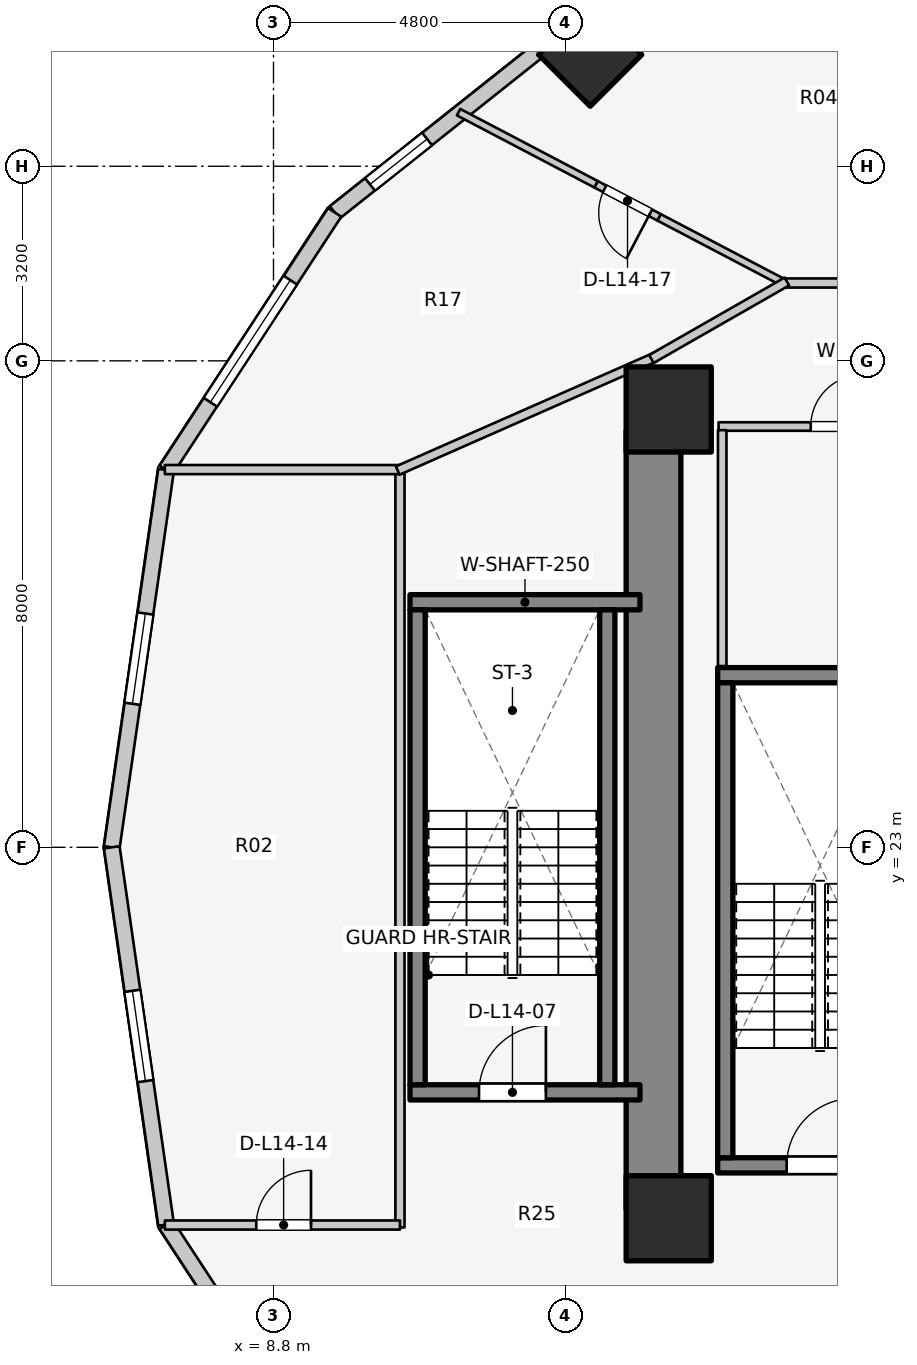
"""IFC4 building model, lengths in metres.
Left out: names, types, materials, properties, quantities, classifications, styles, units other than length and angle.
Written with IfcOpenShell. Run it as: python <this file> out.ifc"""

import sys

from ifc_helpers import new_model, si_unit, direction, frame, frame_2d, origin, origin_2d, place, context, subcontext, project, spatial, rectangle, extrude, element, fill, save


model = new_model("IFC4")
c1 = context("Model", 3, precision=1e-05, world=origin(), true_north=direction((0.0, 1.0)))
c2 = subcontext(c1, "Body", "Model", "MODEL_VIEW")
j1 = project(units=[si_unit("LENGTHUNIT", "METRE"), si_unit("PLANEANGLEUNIT", "RADIAN")], contexts=[c1])
p1 = place(None, origin())
s1 = spatial("IfcSite", under=j1, at=p1, CompositionType="ELEMENT")
p2 = place(p1, origin())
s2 = spatial("IfcBuilding", under=s1, at=p2, CompositionType="ELEMENT")
p3 = place(p2, frame((0.0, 0.0, 49.3)))
s3 = spatial("IfcBuildingStorey", under=s2, at=p3, CompositionType="ELEMENT", Elevation=49.3)
p4 = place(p3, frame((15.05, 17.05, 0.0), z_axis=(0.0, 0.0, 1.0), x_axis=(0.0, 1.0, 0.0)))
e1 = element("IfcWall", 1, at=p4, inside=s3, PredefinedType="SHEAR", context=c2, shape_type="SweptSolid", body=[
    extrude(rectangle(XDim=12.8, YDim=0.9, at=frame_2d((6.4, 0.0))), origin(), (0.0, 0.0, 1.0), 3.1),
])
p5 = place(p3, frame((16.105, 17.77, 0.0), z_axis=(0.0, 0.0, 1.0), x_axis=(1.0, 0.0, 0.0)))
e2 = element("IfcWall", 2, at=p5, inside=s3, PredefinedType="SOLIDWALL", context=c2, shape_type="SweptSolid", body=[
    extrude(rectangle(XDim=3.37, YDim=0.25, at=frame_2d((1.685, 0.0))), origin(), (0.0, 0.0, 1.0), 3.1),
])
p6 = place(p5, frame((1.135, 0.0, 0.0)))
e3 = element("IfcOpeningElement", 3, at=p6, cuts=e2, PredefinedType="OPENING", context=c2, shape_type="SweptSolid", body=[
    extrude(rectangle(XDim=1.1, YDim=2.1, at=frame_2d((0.55, 1.05))), frame((0.0, 0.135, 0.0), z_axis=(0.0, -1.0, 0.0), x_axis=(1.0, 0.0, 0.0)), (0.0, 0.0, 1.0), 0.27),
])
p7 = place(p3, frame((16.105, 25.83, 0.0), z_axis=(0.0, 0.0, 1.0), x_axis=(1.0, 0.0, 0.0)))
e4 = element("IfcWall", 4, at=p7, inside=s3, PredefinedType="SOLIDWALL", context=c2, shape_type="SweptSolid", body=[
    extrude(rectangle(XDim=3.37, YDim=0.25, at=frame_2d((1.685, 0.0))), origin(), (0.0, 0.0, 1.0), 3.1),
])
p8 = place(p3, frame((16.23, 17.895, 0.0), z_axis=(0.0, 0.0, 1.0), x_axis=(0.0, 1.0, 0.0)))
e5 = element("IfcWall", 5, at=p8, inside=s3, PredefinedType="SOLIDWALL", context=c2, shape_type="SweptSolid", body=[
    extrude(rectangle(XDim=7.81, YDim=0.25, at=frame_2d((3.905, 0.0))), origin(), (0.0, 0.0, 1.0), 3.1),
])
p9 = place(p3, frame((11.045, 18.97, 0.0), z_axis=(0.0, 0.0, 1.0), x_axis=(1.0, 0.0, 0.0)))
e6 = element("IfcWall", 6, at=p9, inside=s3, PredefinedType="SOLIDWALL", context=c2, shape_type="SweptSolid", body=[
    extrude(rectangle(XDim=3.782, YDim=0.25, at=frame_2d((1.891, 0.0))), origin(), (0.0, 0.0, 1.0), 3.1),
])
p10 = place(p9, frame((1.135, 0.0, 0.0)))
e7 = element("IfcOpeningElement", 7, at=p10, cuts=e6, PredefinedType="OPENING", context=c2, shape_type="SweptSolid", body=[
    extrude(rectangle(XDim=1.1, YDim=2.1, at=frame_2d((0.55, 1.05))), frame((0.0, 0.135, 0.0), z_axis=(0.0, -1.0, 0.0), x_axis=(1.0, 0.0, 0.0)), (0.0, 0.0, 1.0), 0.27),
])
p11 = place(p3, frame((11.045, 27.03, 0.0), z_axis=(0.0, 0.0, 1.0), x_axis=(1.0, 0.0, 0.0)))
e8 = element("IfcWall", 8, at=p11, inside=s3, PredefinedType="SOLIDWALL", context=c2, shape_type="SweptSolid", body=[
    extrude(rectangle(XDim=3.782, YDim=0.25, at=frame_2d((1.891, 0.0))), origin(), (0.0, 0.0, 1.0), 3.1),
])
for number, where, z_axis, x_axis in (
    (9, (11.17, 19.095, 0.0), (0.0, 0.0, 1.0), (0.0, 1.0, 0.0)),
    (10, (14.29, 19.095, 0.0), (0.0, 0.0, 1.0), (0.0, 1.0, 0.0)),
):
    element("IfcWall", number, at=place(p3, frame(where, z_axis=z_axis, x_axis=x_axis)), inside=s3, PredefinedType="SOLIDWALL", context=c2, shape_type="SweptSolid", body=[
        extrude(rectangle(XDim=7.81, YDim=0.25, at=frame_2d((3.905, 0.0))), origin(), (0.0, 0.0, 1.0), 3.1),
    ])
for number, where, z_axis, x_axis in (
    (11, (15.3, 16.9, 0.0), (0.0, 0.0, 1.0), (1.0, 0.0, 0.0)),
    (12, (15.3, 30.2, 0.0), (0.0, 0.0, 1.0), (1.0, 0.0, 0.0)),
):
    element("IfcColumn", number, at=place(p3, frame(where, z_axis=z_axis, x_axis=x_axis)), inside=s3, PredefinedType="COLUMN", context=c2, shape_type="SweptSolid", body=[
        extrude(rectangle(XDim=1.4, YDim=1.4, at=origin_2d()), origin(), (0.0, 0.0, 1.0), 3.1),
    ])
p12 = place(p3, frame((14.008, 36.035, 0.0), z_axis=(0.0, 0.0, 1.0), x_axis=(-0.707106781187, 0.707106781187, 0.0)))
e13 = element("IfcColumn", 13, at=p12, inside=s3, PredefinedType="COLUMN", context=c2, shape_type="SweptSolid", body=[
    extrude(rectangle(XDim=1.2, YDim=1.2, at=origin_2d()), origin(), (0.0, 0.0, 1.0), 3.1),
])
p13 = place(p3, frame((13.595, 36.45, 0.0), z_axis=(0.0, 0.0, 1.0), x_axis=(-0.783123133379, -0.621866672179, 0.0)))
e14 = element("IfcWall", 14, at=p13, inside=s3, PredefinedType="STANDARD", context=c2, shape_type="SweptSolid", body=[
    extrude(rectangle(XDim=4.839, YDim=0.26, at=frame_2d((2.419, 0.0))), origin(), (0.0, 0.0, 1.0), 2.85),
])
p14 = place(p13, frame((2.898, 0.0, 0.75)))
e15 = element("IfcOpeningElement", 15, at=p14, cuts=e14, PredefinedType="OPENING", context=c2, shape_type="SweptSolid", body=[
    extrude(rectangle(XDim=1.2, YDim=1.5, at=frame_2d((0.6, 0.75))), frame((0.0, 0.14, 0.0), z_axis=(0.0, -1.0, 0.0), x_axis=(1.0, 0.0, 0.0)), (0.0, 0.0, 1.0), 0.28),
])
p15 = place(p3, frame((9.806, 33.441, 0.0), z_axis=(0.0, 0.0, 1.0), x_axis=(-0.547702757047, -0.836672988642, 0.0)))
e16 = element("IfcWall", 16, at=p15, inside=s3, PredefinedType="STANDARD", context=c2, shape_type="SweptSolid", body=[
    extrude(rectangle(XDim=5.062, YDim=0.26, at=frame_2d((2.531, 0.0))), origin(), (0.0, 0.0, 1.0), 2.85),
])
p16 = place(p15, frame((1.331, 0.0, 0.75)))
e17 = element("IfcOpeningElement", 17, at=p16, cuts=e16, PredefinedType="OPENING", context=c2, shape_type="SweptSolid", body=[
    extrude(rectangle(XDim=2.4, YDim=1.7, at=frame_2d((1.2, 0.85))), frame((0.0, 0.14, 0.0), z_axis=(0.0, -1.0, 0.0), x_axis=(1.0, 0.0, 0.0)), (0.0, 0.0, 1.0), 0.28),
])
p17 = place(p3, frame((7.033, 29.205, 0.0), z_axis=(0.0, 0.0, 1.0), x_axis=(-0.142528001686, -0.989790770181, 0.0)))
e18 = element("IfcWall", 18, at=p17, inside=s3, PredefinedType="STANDARD", context=c2, shape_type="SweptSolid", body=[
    extrude(rectangle(XDim=6.269, YDim=0.26, at=frame_2d((3.135, 0.0))), origin(), (0.0, 0.0, 1.0), 2.85),
])
p18 = place(p17, frame((2.385, 0.0, 0.75)))
e19 = element("IfcOpeningElement", 19, at=p18, cuts=e18, PredefinedType="OPENING", context=c2, shape_type="SweptSolid", body=[
    extrude(rectangle(XDim=1.5, YDim=1.6, at=frame_2d((0.75, 0.8))), frame((0.0, 0.14, 0.0), z_axis=(0.0, -1.0, 0.0), x_axis=(1.0, 0.0, 0.0)), (0.0, 0.0, 1.0), 0.28),
])
p19 = place(p3, frame((6.14, 23.0, 0.0), z_axis=(0.0, 0.0, 1.0), x_axis=(0.142528001686, -0.989790770181, 0.0)))
e20 = element("IfcWall", 20, at=p19, inside=s3, PredefinedType="STANDARD", context=c2, shape_type="SweptSolid", body=[
    extrude(rectangle(XDim=6.269, YDim=0.26, at=frame_2d((3.135, 0.0))), origin(), (0.0, 0.0, 1.0), 2.85),
])
p20 = place(p19, frame((2.385, 0.0, 0.75)))
e21 = element("IfcOpeningElement", 21, at=p20, cuts=e20, PredefinedType="OPENING", context=c2, shape_type="SweptSolid", body=[
    extrude(rectangle(XDim=1.5, YDim=1.6, at=frame_2d((0.75, 0.8))), frame((0.0, 0.14, 0.0), z_axis=(0.0, -1.0, 0.0), x_axis=(1.0, 0.0, 0.0)), (0.0, 0.0, 1.0), 0.28),
])
p21 = place(p3, frame((7.033, 16.795, 0.0), z_axis=(0.0, 0.0, 1.0), x_axis=(0.547702757047, -0.836672988642, 0.0)))
e22 = element("IfcWall", 22, at=p21, inside=s3, PredefinedType="STANDARD", context=c2, shape_type="SweptSolid", body=[
    extrude(rectangle(XDim=5.062, YDim=0.26, at=frame_2d((2.531, 0.0))), origin(), (0.0, 0.0, 1.0), 2.85),
])
p22 = place(p21, frame((1.331, 0.0, 0.75)))
e23 = element("IfcOpeningElement", 23, at=p22, cuts=e22, PredefinedType="OPENING", context=c2, shape_type="SweptSolid", body=[
    extrude(rectangle(XDim=2.4, YDim=1.7, at=frame_2d((1.2, 0.85))), frame((0.0, 0.14, 0.0), z_axis=(0.0, -1.0, 0.0), x_axis=(1.0, 0.0, 0.0)), (0.0, 0.0, 1.0), 0.28),
])
p23 = place(p3, frame((16.12, 29.92, 0.0), z_axis=(0.0, 0.0, 1.0), x_axis=(1.0, 0.0, 0.0)))
e24 = element("IfcWall", 24, at=p23, inside=s3, PredefinedType="PLUMBINGWALL", context=c2, shape_type="SweptSolid", body=[
    extrude(rectangle(XDim=3.3, YDim=0.14, at=frame_2d((1.65, 0.0))), origin(), (0.0, 0.0, 1.0), 2.855),
])
p24 = place(p23, frame((1.516, 0.0, 0.0)))
e25 = element("IfcOpeningElement", 25, at=p24, cuts=e24, PredefinedType="OPENING", context=c2, shape_type="SweptSolid", body=[
    extrude(rectangle(XDim=0.85, YDim=2.05, at=frame_2d((0.425, 1.025))), frame((0.0, 0.08, 0.0), z_axis=(0.0, -1.0, 0.0), x_axis=(1.0, 0.0, 0.0)), (0.0, 0.0, 1.0), 0.16),
])
p25 = place(p3, frame((16.18, 25.98, 0.0), z_axis=(0.0, 0.0, 1.0), x_axis=(0.0, 1.0, 0.0)))
e26 = element("IfcWall", 26, at=p25, inside=s3, PredefinedType="PLUMBINGWALL", context=c2, shape_type="SweptSolid", body=[
    extrude(rectangle(XDim=3.88, YDim=0.14, at=frame_2d((1.94, 0.0))), origin(), (0.0, 0.0, 1.0), 2.855),
])
p26 = place(p3, frame((10.88, 16.748, 0.0), z_axis=(0.0, 0.0, 1.0), x_axis=(0.0, 1.0, 0.0)))
e27 = element("IfcWall", 27, at=p26, inside=s3, PredefinedType="PARTITIONING", context=c2, shape_type="SweptSolid", body=[
    extrude(rectangle(XDim=12.503, YDim=0.15, at=frame_2d((6.252, 0.0))), origin(), (0.0, 0.0, 1.0), 2.12),
])
p27 = place(p3, frame((7.014, 16.788, 0.0), z_axis=(0.0, 0.0, 1.0), x_axis=(1.0, 0.0, 0.0)))
e28 = element("IfcWall", 28, at=p27, inside=s3, PredefinedType="PARTITIONING", context=c2, shape_type="SweptSolid", body=[
    extrude(rectangle(XDim=3.866, YDim=0.15, at=frame_2d((1.933, 0.0))), origin(), (0.0, 0.0, 1.0), 2.855),
])
p28 = place(p27, frame((1.503, 0.0, 0.0)))
e29 = element("IfcOpeningElement", 29, at=p28, cuts=e28, PredefinedType="OPENING", context=c2, shape_type="SweptSolid", body=[
    extrude(rectangle(XDim=0.9, YDim=2.1, at=frame_2d((0.45, 1.05))), frame((0.0, 0.085, 0.0), z_axis=(0.0, -1.0, 0.0), x_axis=(1.0, 0.0, 0.0)), (0.0, 0.0, 1.0), 0.17),
])
p29 = place(p3, frame((7.014, 29.212, 0.0), z_axis=(0.0, 0.0, 1.0), x_axis=(1.0, 0.0, 0.0)))
e30 = element("IfcWall", 30, at=p29, inside=s3, PredefinedType="PARTITIONING", context=c2, shape_type="SweptSolid", body=[
    extrude(rectangle(XDim=3.866, YDim=0.15, at=frame_2d((1.933, 0.0))), origin(), (0.0, 0.0, 1.0), 2.855),
])
p30 = place(p3, frame((10.844, 29.196, 0.0), z_axis=(0.0, 0.0, 1.0), x_axis=(0.91502756289, 0.403391322604, 0.0)))
e31 = element("IfcWall", 31, at=p30, inside=s3, PredefinedType="PARTITIONING", context=c2, shape_type="SweptSolid", body=[
    extrude(rectangle(XDim=4.637, YDim=0.15, at=frame_2d((2.319, 0.0))), origin(), (0.0, 0.0, 1.0), 2.069),
])
p31 = place(p3, frame((17.244, 32.257, 0.0), z_axis=(0.0, 0.0, 1.0), x_axis=(-0.885586030676, 0.464475383924, 0.0)))
e32 = element("IfcWall", 32, at=p31, inside=s3, PredefinedType="MOVABLE", context=c2, shape_type="SweptSolid", body=[
    extrude(rectangle(XDim=2.376, YDim=0.12, at=frame_2d((1.188, 0.0))), origin(), (0.0, 0.0, 1.0), 2.855),
])
p32 = place(p3, frame((15.14, 33.36, 0.0), z_axis=(0.0, 0.0, 1.0), x_axis=(-0.885447282698, 0.464739829972, 0.0)))
e33 = element("IfcWall", 33, at=p32, inside=s3, PredefinedType="MOVABLE", context=c2, shape_type="SweptSolid", body=[
    extrude(rectangle(XDim=1.17, YDim=0.12, at=frame_2d((0.585, 0.0))), origin(), (0.0, 0.0, 1.0), 2.11),
])
p33 = place(p32, frame((0.16, 0.0, 0.0)))
e34 = element("IfcOpeningElement", 34, at=p33, cuts=e33, PredefinedType="OPENING", context=c2, shape_type="SweptSolid", body=[
    extrude(rectangle(XDim=0.85, YDim=2.05, at=frame_2d((0.425, 1.025))), frame((0.0, 0.07, 0.0), z_axis=(0.0, -1.0, 0.0), x_axis=(1.0, 0.0, 0.0)), (0.0, 0.0, 1.0), 0.14),
])
p34 = place(p3, frame((14.104, 33.904, 0.0), z_axis=(0.0, 0.0, 1.0), x_axis=(-0.885573027611, 0.464500175208, 0.0)))
e35 = element("IfcWall", 35, at=p34, inside=s3, PredefinedType="MOVABLE", context=c2, shape_type="SweptSolid", body=[
    extrude(rectangle(XDim=2.552, YDim=0.12, at=frame_2d((1.276, 0.0))), origin(), (0.0, 0.0, 1.0), 2.855),
])
p35 = place(p3, frame((17.15, 32.28, 0.0), z_axis=(0.0, 0.0, 1.0), x_axis=(1.0, 0.0, 0.0)))
e36 = element("IfcWall", 36, at=p35, inside=s3, PredefinedType="PARTITIONING", context=c2, shape_type="SweptSolid", body=[
    extrude(rectangle(XDim=7.52, YDim=0.15, at=frame_2d((3.76, 0.0))), origin(), (0.0, 0.0, 1.0), 2.237),
])
p36 = place(p35, frame((1.3, 0.0, 0.0)))
e37 = element("IfcOpeningElement", 37, at=p36, cuts=e36, PredefinedType="OPENING", context=c2, shape_type="SweptSolid", body=[
    extrude(rectangle(XDim=0.9, YDim=2.1, at=frame_2d((0.45, 1.05))), frame((0.0, 0.085, 0.0), z_axis=(0.0, -1.0, 0.0), x_axis=(1.0, 0.0, 0.0)), (0.0, 0.0, 1.0), 0.17),
])
p37 = place(p3, frame((17.243, 32.305, 0.0), z_axis=(0.0, 0.0, 1.0), x_axis=(-0.867991349648, -0.496579315857, 0.0)))
e38 = element("IfcWall", 38, at=p37, inside=s3, PredefinedType="PARTITIONING", context=c2, shape_type="SweptSolid", body=[
    extrude(rectangle(XDim=2.567, YDim=0.15, at=frame_2d((1.283, 0.0))), origin(), (0.0, 0.0, 1.0), 2.069),
])
p38 = place(p14, origin())
e39 = element("IfcWindow", 39, at=p38, inside=s3, PartitioningType="SINGLE_PANEL", PredefinedType="WINDOW", context=c2, shape_type="SweptSolid", body=[
    extrude(rectangle(XDim=1.2, YDim=1.5, at=frame_2d((0.6, 0.75))), frame((0.0, 0.03, 0.0), z_axis=(0.0, -1.0, 0.0), x_axis=(1.0, 0.0, 0.0)), (0.0, 0.0, 1.0), 0.06),
])
fill(e15, e39)
p39 = place(p16, origin())
e40 = element("IfcWindow", 40, at=p39, inside=s3, PartitioningType="SINGLE_PANEL", PredefinedType="WINDOW", context=c2, shape_type="SweptSolid", body=[
    extrude(rectangle(XDim=2.4, YDim=1.7, at=frame_2d((1.2, 0.85))), frame((0.0, 0.03, 0.0), z_axis=(0.0, -1.0, 0.0), x_axis=(1.0, 0.0, 0.0)), (0.0, 0.0, 1.0), 0.06),
])
fill(e17, e40)
p40 = place(p18, origin())
e41 = element("IfcWindow", 41, at=p40, inside=s3, PartitioningType="SINGLE_PANEL", PredefinedType="WINDOW", context=c2, shape_type="SweptSolid", body=[
    extrude(rectangle(XDim=1.5, YDim=1.6, at=frame_2d((0.75, 0.8))), frame((0.0, 0.03, 0.0), z_axis=(0.0, -1.0, 0.0), x_axis=(1.0, 0.0, 0.0)), (0.0, 0.0, 1.0), 0.06),
])
fill(e19, e41)
p41 = place(p20, origin())
e42 = element("IfcWindow", 42, at=p41, inside=s3, PartitioningType="SINGLE_PANEL", PredefinedType="WINDOW", context=c2, shape_type="SweptSolid", body=[
    extrude(rectangle(XDim=1.5, YDim=1.6, at=frame_2d((0.75, 0.8))), frame((0.0, 0.03, 0.0), z_axis=(0.0, -1.0, 0.0), x_axis=(1.0, 0.0, 0.0)), (0.0, 0.0, 1.0), 0.06),
])
fill(e21, e42)
p42 = place(p6, origin())
e43 = element("IfcDoor", 43, at=p42, inside=s3, OperationType="SINGLE_SWING_RIGHT", PredefinedType="DOOR", context=c2, shape_type="SweptSolid", body=[
    extrude(rectangle(XDim=1.1, YDim=2.1, at=frame_2d((0.55, 1.05))), frame((0.0, 0.025, 0.0), z_axis=(0.0, -1.0, 0.0), x_axis=(1.0, 0.0, 0.0)), (0.0, 0.0, 1.0), 0.05),
])
fill(e3, e43)
p43 = place(p10, origin())
e44 = element("IfcDoor", 44, at=p43, inside=s3, OperationType="SINGLE_SWING_RIGHT", PredefinedType="DOOR", context=c2, shape_type="SweptSolid", body=[
    extrude(rectangle(XDim=1.1, YDim=2.1, at=frame_2d((0.55, 1.05))), frame((0.0, 0.025, 0.0), z_axis=(0.0, -1.0, 0.0), x_axis=(1.0, 0.0, 0.0)), (0.0, 0.0, 1.0), 0.05),
])
fill(e7, e44)
p44 = place(p24, origin())
e45 = element("IfcDoor", 45, at=p44, inside=s3, OperationType="SINGLE_SWING_RIGHT", PredefinedType="DOOR", context=c2, shape_type="SweptSolid", body=[
    extrude(rectangle(XDim=0.85, YDim=2.05, at=frame_2d((0.425, 1.025))), frame((0.0, 0.025, 0.0), z_axis=(0.0, -1.0, 0.0), x_axis=(1.0, 0.0, 0.0)), (0.0, 0.0, 1.0), 0.05),
])
fill(e25, e45)
p45 = place(p28, origin())
e46 = element("IfcDoor", 46, at=p45, inside=s3, OperationType="SINGLE_SWING_RIGHT", PredefinedType="DOOR", context=c2, shape_type="SweptSolid", body=[
    extrude(rectangle(XDim=0.9, YDim=2.1, at=frame_2d((0.45, 1.05))), frame((0.0, 0.025, 0.0), z_axis=(0.0, -1.0, 0.0), x_axis=(1.0, 0.0, 0.0)), (0.0, 0.0, 1.0), 0.05),
])
fill(e29, e46)
p46 = place(p33, origin())
e47 = element("IfcDoor", 47, at=p46, inside=s3, OperationType="SINGLE_SWING_LEFT", PredefinedType="DOOR", context=c2, shape_type="SweptSolid", body=[
    extrude(rectangle(XDim=0.85, YDim=2.05, at=frame_2d((0.425, 1.025))), frame((0.0, 0.025, 0.0), z_axis=(0.0, -1.0, 0.0), x_axis=(1.0, 0.0, 0.0)), (0.0, 0.0, 1.0), 0.05),
])
fill(e34, e47)
save(model, sys.argv[1])
